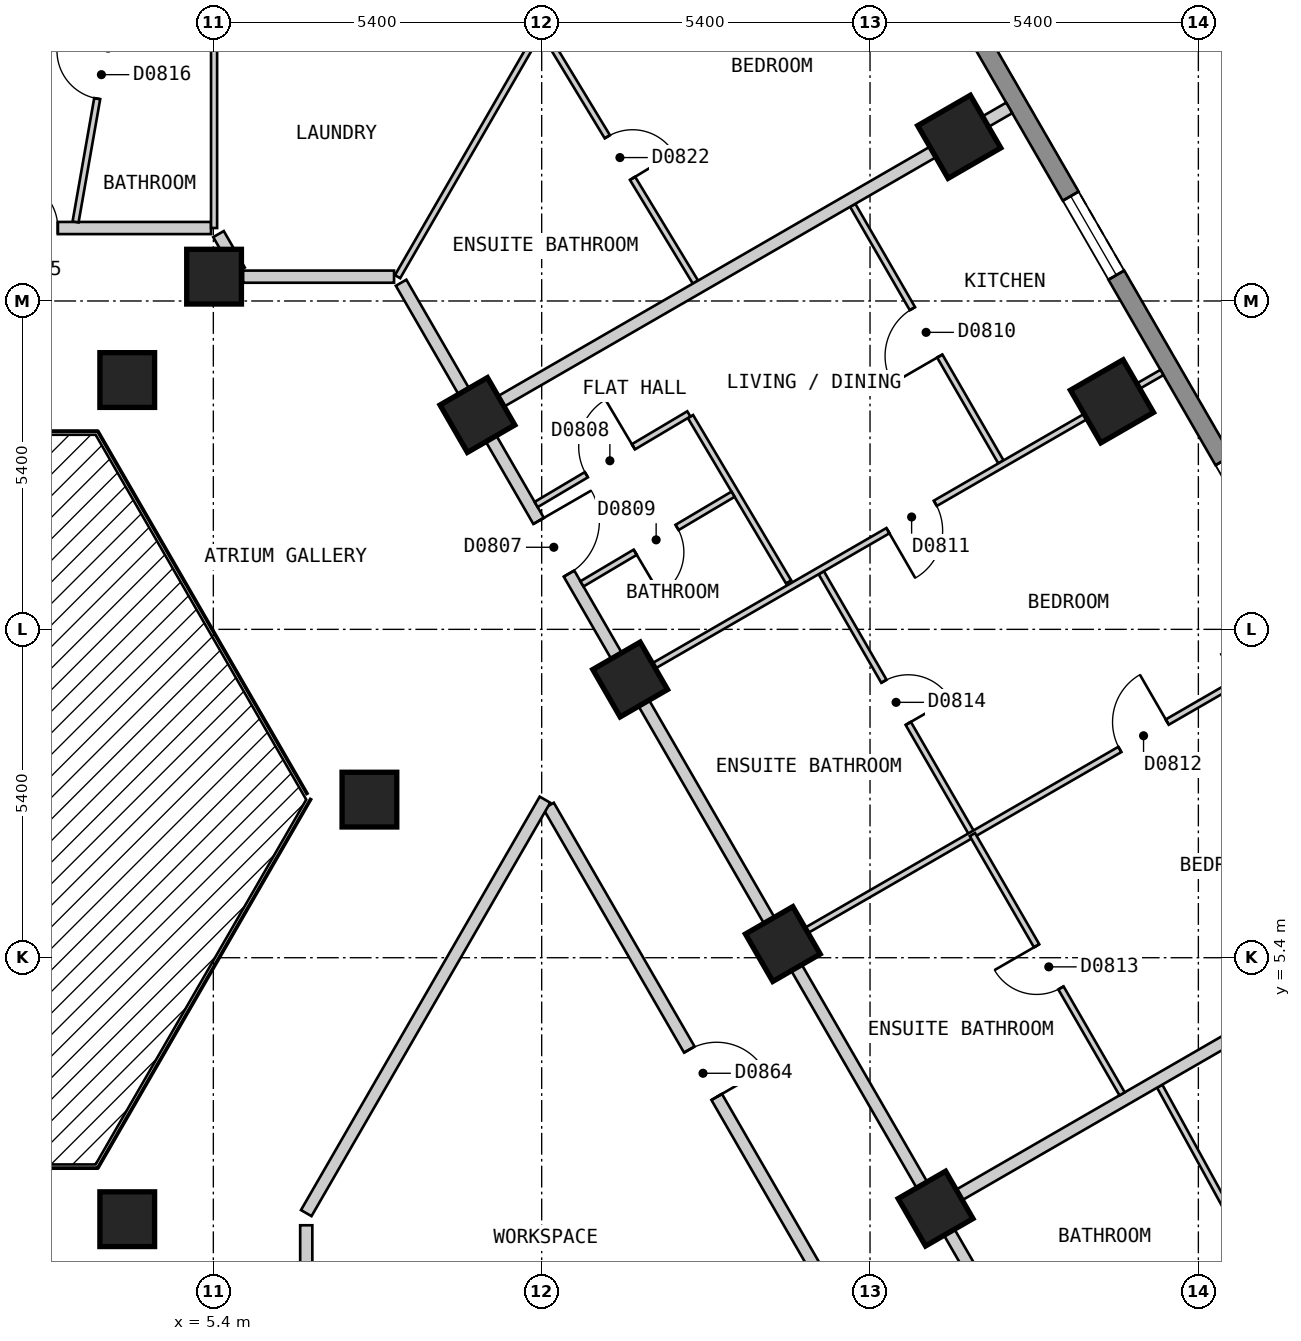
"""IFC4 building model, lengths in metres.
Left out: names, types, materials, properties, quantities, classifications, styles, units other than length and angle.
Written with IfcOpenShell. Run it as: python <this file> out.ifc"""

import sys

from ifc_helpers import new_model, si_unit, direction, frame, frame_2d, origin, origin_2d, place, context, subcontext, project, spatial, polyline, rectangle, outline, extrude, element, fill, save


model = new_model("IFC4")
c1 = context("Model", 3, precision=1e-05, world=origin(), true_north=direction((0.0, 1.0)))
c2 = subcontext(c1, "Body", "Model", "MODEL_VIEW")
j1 = project(units=[si_unit("LENGTHUNIT", "METRE"), si_unit("PLANEANGLEUNIT", "RADIAN")], contexts=[c1])
p1 = place(None, origin())
s1 = spatial("IfcSite", under=j1, at=p1, CompositionType="ELEMENT")
p2 = place(p1, origin())
s2 = spatial("IfcBuilding", under=s1, at=p2, CompositionType="ELEMENT")
p3 = place(p2, frame((0.0, 0.0, 72.0)))
s3 = spatial("IfcBuildingStorey", under=s2, at=p3, CompositionType="ELEMENT", Elevation=72.0)
for number, where, z_axis, x_axis in (
    (1, (20.179, 14.55, 0.0), (0.0, 0.0, 1.0), (-0.5, 0.866, 0.0)),
    (2, (17.667, 18.9, 0.0), (0.0, 0.0, 1.0), (-0.5, 0.866, 0.0)),
):
    element("IfcColumn", number, at=place(p3, frame(where, z_axis=z_axis, x_axis=x_axis)), inside=s3, PredefinedType="COLUMN", context=c2, shape_type="SweptSolid", body=[
        extrude(rectangle(XDim=1.0, YDim=1.0, at=origin_2d()), origin(), (0.0, 0.0, 1.0), 3.0),
    ])
for number, where, z_axis, x_axis in (
    (3, (17.278, 1.274, 0.0), (0.0, 0.0, 1.0), (-0.5, 0.866, 0.0)),
    (4, (3.984, 1.1, 0.0), (0.0, 0.0, 1.0), (1.0, 0.0, 0.0)),
    (5, (14.766, 5.625, 0.0), (0.0, 0.0, 1.0), (-0.5, 0.866, 0.0)),
    (6, (12.255, 9.975, 0.0), (0.0, 0.0, 1.0), (-0.5, 0.866, 0.0)),
    (7, (7.967, 8.0, 0.0), (0.0, 0.0, 1.0), (1.0, 0.0, 0.0)),
    (8, (9.743, 14.325, 0.0), (0.0, 0.0, 1.0), (-0.5, 0.866, 0.0)),
    (9, (5.412, 16.6, 0.0), (0.0, 0.0, 1.0), (-1.0, 0.0, 0.0)),
    (10, (3.984, 14.9, 0.0), (0.0, 0.0, 1.0), (1.0, 0.0, 0.0)),
):
    element("IfcColumn", number, at=place(p3, frame(where, z_axis=z_axis, x_axis=x_axis)), inside=s3, PredefinedType="COLUMN", context=c2, shape_type="SweptSolid", body=[
        extrude(rectangle(XDim=0.9, YDim=0.9, at=origin_2d()), origin(), (0.0, 0.0, 1.0), 3.0),
    ])
p4 = place(p3, frame((29.027, 1.425, 0.0), z_axis=(0.0, 0.0, 1.0), x_axis=(-0.500027479704, 0.866009537788, 0.0)))
e11 = element("IfcWall", 11, at=p4, inside=s3, PredefinedType="SOLIDWALL", context=c2, shape_type="SweptSolid", body=[
    extrude(outline(polyline([(0.0, -0.15), (26.559, -0.15), (26.478, 0.15), (0.08, 0.15), (0.0, -0.15)])), origin(), (0.0, 0.0, 1.0), 2.7),
])
p5 = place(p4, frame((2.483, 0.0, 0.15)))
e12 = element("IfcOpeningElement", 12, at=p5, cuts=e11, PredefinedType="OPENING", context=c2, shape_type="SweptSolid", body=[
    extrude(rectangle(XDim=1.5, YDim=2.1, at=frame_2d((0.75, 1.05))), frame((0.0, 0.16, 0.0), z_axis=(0.0, -1.0, 0.0), x_axis=(1.0, 0.0, 0.0)), (0.0, 0.0, 1.0), 0.32),
])
p6 = place(p4, frame((7.506, 0.0, 0.15)))
e13 = element("IfcOpeningElement", 13, at=p6, cuts=e11, PredefinedType="OPENING", context=c2, shape_type="SweptSolid", body=[
    extrude(rectangle(XDim=1.5, YDim=2.1, at=frame_2d((0.75, 1.05))), frame((0.0, 0.16, 0.0), z_axis=(0.0, -1.0, 0.0), x_axis=(1.0, 0.0, 0.0)), (0.0, 0.0, 1.0), 0.32),
])
p7 = place(p4, frame((12.529, 0.0, 0.15)))
e14 = element("IfcOpeningElement", 14, at=p7, cuts=e11, PredefinedType="OPENING", context=c2, shape_type="SweptSolid", body=[
    extrude(rectangle(XDim=1.5, YDim=2.1, at=frame_2d((0.75, 1.05))), frame((0.0, 0.16, 0.0), z_axis=(0.0, -1.0, 0.0), x_axis=(1.0, 0.0, 0.0)), (0.0, 0.0, 1.0), 0.32),
])
p8 = place(p4, frame((17.552, 0.0, 0.15)))
e15 = element("IfcOpeningElement", 15, at=p8, cuts=e11, PredefinedType="OPENING", context=c2, shape_type="SweptSolid", body=[
    extrude(rectangle(XDim=1.5, YDim=2.1, at=frame_2d((0.75, 1.05))), frame((0.0, 0.16, 0.0), z_axis=(0.0, -1.0, 0.0), x_axis=(1.0, 0.0, 0.0)), (0.0, 0.0, 1.0), 0.32),
])
p9 = place(p4, frame((22.575, 0.0, 0.15)))
e16 = element("IfcOpeningElement", 16, at=p9, cuts=e11, PredefinedType="OPENING", context=c2, shape_type="SweptSolid", body=[
    extrude(rectangle(XDim=1.5, YDim=2.1, at=frame_2d((0.75, 1.05))), frame((0.0, 0.16, 0.0), z_axis=(0.0, -1.0, 0.0), x_axis=(1.0, 0.0, 0.0)), (0.0, 0.0, 1.0), 0.32),
])
p10 = place(p3, frame((5.485, 17.3, 0.0), z_axis=(0.0, 0.0, 1.0), x_axis=(0.499437640892, -0.866349838611, 0.0)))
e17 = element("IfcWall", 17, at=p10, inside=s3, PredefinedType="PARTITIONING", context=c2, shape_type="SweptSolid", body=[
    extrude(rectangle(XDim=0.693, YDim=0.2, at=frame_2d((0.346, 0.0))), origin(), (0.0, 0.0, 1.0), 2.7),
])
p11 = place(p3, frame((10.913, 7.899, 0.0), z_axis=(0.0, 0.0, 1.0), x_axis=(0.500028940566, -0.866008694296, 0.0)))
e18 = element("IfcWall", 18, at=p11, inside=s3, PredefinedType="PARTITIONING", context=c2, shape_type="SweptSolid", body=[
    extrude(rectangle(XDim=10.159, YDim=0.2, at=frame_2d((5.08, 0.0))), origin(), (0.0, 0.0, 1.0), 2.7),
])
p12 = place(p11, frame((4.63, 0.0, 0.0)))
e19 = element("IfcOpeningElement", 19, at=p12, cuts=e18, PredefinedType="OPENING", context=c2, shape_type="SweptSolid", body=[
    extrude(rectangle(XDim=0.9, YDim=2.1, at=frame_2d((0.45, 1.05))), frame((0.0, 0.11, 0.0), z_axis=(0.0, -1.0, 0.0), x_axis=(1.0, 0.0, 0.0)), (0.0, 0.0, 1.0), 0.22),
])
p13 = place(p3, frame((8.488, 16.5, 0.0), z_axis=(0.0, 0.0, 1.0), x_axis=(0.499986836607, -0.86603300354, 0.0)))
e20 = element("IfcWall", 20, at=p13, inside=s3, PredefinedType="PARTITIONING", context=c2, shape_type="SweptSolid", body=[
    extrude(rectangle(XDim=20.09, YDim=0.2, at=frame_2d((10.045, 0.0))), origin(), (0.0, 0.0, 1.0), 2.7),
])
p14 = place(p13, frame((4.523, 0.0, 0.0)))
e21 = element("IfcOpeningElement", 21, at=p14, cuts=e20, PredefinedType="OPENING", context=c2, shape_type="SweptSolid", body=[
    extrude(rectangle(XDim=1.0, YDim=2.1, at=frame_2d((0.5, 1.05))), frame((0.0, 0.11, 0.0), z_axis=(0.0, -1.0, 0.0), x_axis=(1.0, 0.0, 0.0)), (0.0, 0.0, 1.0), 0.22),
])
p15 = place(p3, frame((6.928, 1.0, 0.0), z_axis=(0.0, 0.0, 1.0), x_axis=(0.0, -1.0, 0.0)))
e22 = element("IfcWall", 22, at=p15, inside=s3, PredefinedType="PARTITIONING", context=c2, shape_type="SweptSolid", body=[
    extrude(rectangle(XDim=3.699, YDim=0.2, at=frame_2d((1.85, 0.0))), origin(), (0.0, 0.0, 1.0), 2.7),
])
p16 = place(p3, frame((5.889, 16.6, 0.0), z_axis=(0.0, 0.0, 1.0), x_axis=(1.0, 0.0, 0.0)))
e23 = element("IfcWall", 23, at=p16, inside=s3, PredefinedType="PARTITIONING", context=c2, shape_type="SweptSolid", body=[
    extrude(rectangle(XDim=2.483, YDim=0.2, at=frame_2d((1.242, 0.0))), origin(), (0.0, 0.0, 1.0), 2.7),
])
p17 = place(p3, frame((1.75, 17.4, 0.0), z_axis=(0.0, 0.0, 1.0), x_axis=(1.0, 0.0, 0.0)))
e24 = element("IfcWall", 24, at=p17, inside=s3, PredefinedType="PARTITIONING", context=c2, shape_type="SweptSolid", body=[
    extrude(rectangle(XDim=3.612, YDim=0.2, at=frame_2d((1.806, 0.0))), origin(), (0.0, 0.0, 1.0), 2.7),
])
p18 = place(p17, frame((0.292, 0.0, 0.0)))
e25 = element("IfcOpeningElement", 25, at=p18, cuts=e24, PredefinedType="OPENING", context=c2, shape_type="SweptSolid", body=[
    extrude(rectangle(XDim=0.8, YDim=2.1, at=frame_2d((0.4, 1.05))), frame((0.0, 0.11, 0.0), z_axis=(0.0, -1.0, 0.0), x_axis=(1.0, 0.0, 0.0)), (0.0, 0.0, 1.0), 0.22),
])
p19 = place(p3, frame((6.928, 1.2, 0.0), z_axis=(0.0, 0.0, 1.0), x_axis=(0.500055327065, 0.865993458332, 0.0)))
e26 = element("IfcWall", 26, at=p19, inside=s3, PredefinedType="PARTITIONING", context=c2, shape_type="SweptSolid", body=[
    extrude(rectangle(XDim=7.851, YDim=0.2, at=frame_2d((3.926, 0.0))), origin(), (0.0, 0.0, 1.0), 2.7),
])
p20 = place(p3, frame((10.843, 20.61, 0.0), z_axis=(0.0, 0.0, 1.0), x_axis=(0.518481125811, -0.855089072657, 0.0)))
e27 = element("IfcWall", 27, at=p20, inside=s3, PredefinedType="PARTITIONING", context=c2, shape_type="SweptSolid", body=[
    extrude(rectangle(XDim=4.795, YDim=0.1, at=frame_2d((2.397, 0.0))), origin(), (0.0, 0.0, 1.0), 2.7),
])
p21 = place(p20, frame((1.999, 0.0, 0.0)))
e28 = element("IfcOpeningElement", 28, at=p21, cuts=e27, PredefinedType="OPENING", context=c2, shape_type="SweptSolid", body=[
    extrude(rectangle(XDim=0.8, YDim=2.1, at=frame_2d((0.4, 1.05))), frame((0.0, 0.06, 0.0), z_axis=(0.0, -1.0, 0.0), x_axis=(1.0, 0.0, 0.0)), (0.0, 0.0, 1.0), 0.12),
])
p22 = place(p3, frame((13.247, 14.3, 0.0), z_axis=(0.0, 0.0, 1.0), x_axis=(0.510312234073, -0.85998919979, 0.0)))
e29 = element("IfcWall", 29, at=p22, inside=s3, PredefinedType="PARTITIONING", context=c2, shape_type="SweptSolid", body=[
    extrude(rectangle(XDim=3.163, YDim=0.1, at=frame_2d((1.582, 0.0))), origin(), (0.0, 0.0, 1.0), 2.7),
])
p23 = place(p3, frame((15.398, 11.731, 0.0), z_axis=(0.0, 0.0, 1.0), x_axis=(0.500010064822, -0.866019592779, 0.0)))
e30 = element("IfcWall", 30, at=p23, inside=s3, PredefinedType="PARTITIONING", context=c2, shape_type="SweptSolid", body=[
    extrude(rectangle(XDim=4.972, YDim=0.1, at=frame_2d((2.486, 0.0))), origin(), (0.0, 0.0, 1.0), 2.7),
])
p24 = place(p23, frame((2.061, 0.0, 0.0)))
e31 = element("IfcOpeningElement", 31, at=p24, cuts=e30, PredefinedType="OPENING", context=c2, shape_type="SweptSolid", body=[
    extrude(rectangle(XDim=0.8, YDim=2.1, at=frame_2d((0.4, 1.05))), frame((0.0, 0.06, 0.0), z_axis=(0.0, -1.0, 0.0), x_axis=(1.0, 0.0, 0.0)), (0.0, 0.0, 1.0), 0.12),
])
p25 = place(p3, frame((15.916, 17.773, 0.0), z_axis=(0.0, 0.0, 1.0), x_axis=(0.500093956194, -0.865971151354, 0.0)))
e32 = element("IfcWall", 32, at=p25, inside=s3, PredefinedType="PARTITIONING", context=c2, shape_type="SweptSolid", body=[
    extrude(rectangle(XDim=4.873, YDim=0.1, at=frame_2d((2.437, 0.0))), origin(), (0.0, 0.0, 1.0), 2.7),
])
p26 = place(p25, frame((1.962, 0.0, 0.0)))
e33 = element("IfcOpeningElement", 33, at=p26, cuts=e32, PredefinedType="OPENING", context=c2, shape_type="SweptSolid", body=[
    extrude(rectangle(XDim=0.9, YDim=2.1, at=frame_2d((0.45, 1.05))), frame((0.0, 0.06, 0.0), z_axis=(0.0, -1.0, 0.0), x_axis=(1.0, 0.0, 0.0)), (0.0, 0.0, 1.0), 0.12),
])
p27 = place(p3, frame((20.964, 3.287, 0.0), z_axis=(0.0, 0.0, 1.0), x_axis=(0.48115599782, -0.87663499004, 0.0)))
e34 = element("IfcWall", 34, at=p27, inside=s3, PredefinedType="PARTITIONING", context=c2, shape_type="SweptSolid", body=[
    extrude(rectangle(XDim=4.83, YDim=0.1, at=frame_2d((2.415, 0.0))), origin(), (0.0, 0.0, 1.0), 2.7),
])
p28 = place(p3, frame((8.43, 16.6, 0.0), z_axis=(0.0, 0.0, 1.0), x_axis=(0.50003312339, 0.866006279142, 0.0)))
e35 = element("IfcWall", 35, at=p28, inside=s3, PredefinedType="PARTITIONING", context=c2, shape_type="SweptSolid", body=[
    extrude(rectangle(XDim=4.626, YDim=0.1, at=frame_2d((2.313, 0.0))), origin(), (0.0, 0.0, 1.0), 2.7),
])
p29 = place(p3, frame((3.134, 17.5, 0.0), z_axis=(0.0, 0.0, 1.0), x_axis=(0.172821216702, 0.984953210593, 0.0)))
e36 = element("IfcWall", 36, at=p29, inside=s3, PredefinedType="PARTITIONING", context=c2, shape_type="SweptSolid", body=[
    extrude(rectangle(XDim=4.97, YDim=0.1, at=frame_2d((2.485, 0.0))), origin(), (0.0, 0.0, 1.0), 2.7),
])
p30 = place(p29, frame((2.059, 0.0, 0.0)))
e37 = element("IfcOpeningElement", 37, at=p30, cuts=e36, PredefinedType="OPENING", context=c2, shape_type="SweptSolid", body=[
    extrude(rectangle(XDim=0.8, YDim=2.1, at=frame_2d((0.4, 1.05))), frame((0.0, 0.06, 0.0), z_axis=(0.0, -1.0, 0.0), x_axis=(1.0, 0.0, 0.0)), (0.0, 0.0, 1.0), 0.12),
])
p31 = place(p3, frame((5.412, 17.4, 0.0), z_axis=(0.0, 0.0, 1.0), x_axis=(0.0, 1.0, 0.0)))
e38 = element("IfcWall", 38, at=p31, inside=s3, PredefinedType="PARTITIONING", context=c2, shape_type="SweptSolid", body=[
    extrude(rectangle(XDim=4.925, YDim=0.1, at=frame_2d((2.462, 0.0))), origin(), (0.0, 0.0, 1.0), 2.7),
])
p32 = place(p3, frame((14.853, 5.675, 0.0), z_axis=(0.0, 0.0, 1.0), x_axis=(0.866016855193, 0.500014806302, 0.0)))
e39 = element("IfcWall", 39, at=p32, inside=s3, PredefinedType="PARTITIONING", context=c2, shape_type="SweptSolid", body=[
    extrude(rectangle(XDim=10.0, YDim=0.1, at=frame_2d((5.0, 0.0))), origin(), (0.0, 0.0, 1.0), 2.7),
])
p33 = place(p32, frame((6.3, 0.0, 0.0)))
e40 = element("IfcOpeningElement", 40, at=p33, cuts=e39, PredefinedType="OPENING", context=c2, shape_type="SweptSolid", body=[
    extrude(rectangle(XDim=0.9, YDim=2.1, at=frame_2d((0.45, 1.05))), frame((0.0, 0.06, 0.0), z_axis=(0.0, -1.0, 0.0), x_axis=(1.0, 0.0, 0.0)), (0.0, 0.0, 1.0), 0.12),
])
p34 = place(p3, frame((12.342, 10.025, 0.0), z_axis=(0.0, 0.0, 1.0), x_axis=(0.865992435864, 0.500057097767, 0.0)))
e41 = element("IfcWall", 41, at=p34, inside=s3, PredefinedType="PARTITIONING", context=c2, shape_type="SweptSolid", body=[
    extrude(rectangle(XDim=9.999, YDim=0.1, at=frame_2d((5.0, 0.0))), origin(), (0.0, 0.0, 1.0), 2.7),
])
p35 = place(p34, frame((4.795, 0.0, 0.0)))
e42 = element("IfcOpeningElement", 42, at=p35, cuts=e41, PredefinedType="OPENING", context=c2, shape_type="SweptSolid", body=[
    extrude(rectangle(XDim=0.9, YDim=2.1, at=frame_2d((0.45, 1.05))), frame((0.0, 0.06, 0.0), z_axis=(0.0, -1.0, 0.0), x_axis=(1.0, 0.0, 0.0)), (0.0, 0.0, 1.0), 0.12),
])
p36 = place(p3, frame((11.462, 11.548, 0.0), z_axis=(0.0, 0.0, 1.0), x_axis=(0.860106181478, 0.510115042498, 0.0)))
e43 = element("IfcWall", 43, at=p36, inside=s3, PredefinedType="PARTITIONING", context=c2, shape_type="SweptSolid", body=[
    extrude(rectangle(XDim=2.889, YDim=0.1, at=frame_2d((1.445, 0.0))), origin(), (0.0, 0.0, 1.0), 2.7),
])
p37 = place(p36, frame((1.019, 0.0, 0.0)))
e44 = element("IfcOpeningElement", 44, at=p37, cuts=e43, PredefinedType="OPENING", context=c2, shape_type="SweptSolid", body=[
    extrude(rectangle(XDim=0.8, YDim=2.1, at=frame_2d((0.4, 1.05))), frame((0.0, 0.06, 0.0), z_axis=(0.0, -1.0, 0.0), x_axis=(1.0, 0.0, 0.0)), (0.0, 0.0, 1.0), 0.12),
])
p38 = place(p3, frame((10.709, 12.853, 0.0), z_axis=(0.0, 0.0, 1.0), x_axis=(0.859991215576, 0.510308837011, 0.0)))
e45 = element("IfcWall", 45, at=p38, inside=s3, PredefinedType="PARTITIONING", context=c2, shape_type="SweptSolid", body=[
    extrude(rectangle(XDim=2.92, YDim=0.1, at=frame_2d((1.46, 0.0))), origin(), (0.0, 0.0, 1.0), 2.7),
])
p39 = place(p38, frame((0.96, 0.0, 0.0)))
e46 = element("IfcOpeningElement", 46, at=p39, cuts=e45, PredefinedType="OPENING", context=c2, shape_type="SweptSolid", body=[
    extrude(rectangle(XDim=0.9, YDim=2.1, at=frame_2d((0.45, 1.05))), frame((0.0, 0.06, 0.0), z_axis=(0.0, -1.0, 0.0), x_axis=(1.0, 0.0, 0.0)), (0.0, 0.0, 1.0), 0.12),
])
p40 = place(p3, frame((17.365, 1.325, 0.0), z_axis=(0.0, 0.0, 1.0), x_axis=(0.866016855193, 0.500014806302, 0.0)))
e47 = element("IfcWall", 47, at=p40, inside=s3, PredefinedType="PARTITIONING", context=c2, shape_type="SweptSolid", body=[
    extrude(rectangle(XDim=10.0, YDim=0.2, at=frame_2d((5.0, 0.0))), origin(), (0.0, 0.0, 1.0), 2.7),
])
p41 = place(p3, frame((9.83, 14.375, 0.0), z_axis=(0.0, 0.0, 1.0), x_axis=(0.865992435864, 0.500057097767, 0.0)))
e48 = element("IfcWall", 48, at=p41, inside=s3, PredefinedType="PARTITIONING", context=c2, shape_type="SweptSolid", body=[
    extrude(rectangle(XDim=9.999, YDim=0.2, at=frame_2d((5.0, 0.0))), origin(), (0.0, 0.0, 1.0), 2.7),
])
p42 = place(p3, frame((17.884, 7.425, 0.0), z_axis=(0.0, 0.0, 1.0), x_axis=(0.500000007376, -0.866025399526, 0.0)))
e49 = element("IfcWall", 49, at=p42, inside=s3, PredefinedType="PARTITIONING", context=c2, shape_type="SweptSolid", body=[
    extrude(rectangle(XDim=4.924, YDim=0.1, at=frame_2d((2.462, 0.0))), origin(), (0.0, 0.0, 1.0), 2.7),
])
p43 = place(p42, frame((2.112, 0.0, 0.0)))
e50 = element("IfcOpeningElement", 50, at=p43, cuts=e49, PredefinedType="OPENING", context=c2, shape_type="SweptSolid", body=[
    extrude(rectangle(XDim=0.8, YDim=2.1, at=frame_2d((0.4, 1.05))), frame((0.0, 0.06, 0.0), z_axis=(0.0, -1.0, 0.0), x_axis=(1.0, 0.0, 0.0)), (0.0, 0.0, 1.0), 0.12),
])
p44 = place(p8, origin())
e51 = element("IfcWindow", 51, at=p44, inside=s3, PartitioningType="SINGLE_PANEL", PredefinedType="WINDOW", context=c2, shape_type="SweptSolid", body=[
    extrude(rectangle(XDim=1.5, YDim=2.1, at=frame_2d((0.75, 1.05))), frame((0.0, 0.03, 0.0), z_axis=(0.0, -1.0, 0.0), x_axis=(1.0, 0.0, 0.0)), (0.0, 0.0, 1.0), 0.06),
])
fill(e15, e51)
p45 = place(p14, origin())
e52 = element("IfcDoor", 52, at=p45, inside=s3, OperationType="SINGLE_SWING_LEFT", PredefinedType="DOOR", context=c2, shape_type="SweptSolid", body=[
    extrude(rectangle(XDim=1.0, YDim=2.1, at=frame_2d((0.5, 1.05))), frame((0.0, 0.025, 0.0), z_axis=(0.0, -1.0, 0.0), x_axis=(1.0, 0.0, 0.0)), (0.0, 0.0, 1.0), 0.05),
])
fill(e21, e52)
p46 = place(p39, origin())
e53 = element("IfcDoor", 53, at=p46, inside=s3, OperationType="SINGLE_SWING_RIGHT", PredefinedType="DOOR", context=c2, shape_type="SweptSolid", body=[
    extrude(rectangle(XDim=0.9, YDim=2.1, at=frame_2d((0.45, 1.05))), frame((0.0, 0.025, 0.0), z_axis=(0.0, -1.0, 0.0), x_axis=(1.0, 0.0, 0.0)), (0.0, 0.0, 1.0), 0.05),
])
fill(e46, e53)
p47 = place(p37, origin())
e54 = element("IfcDoor", 54, at=p47, inside=s3, OperationType="SINGLE_SWING_LEFT", PredefinedType="DOOR", context=c2, shape_type="SweptSolid", body=[
    extrude(rectangle(XDim=0.8, YDim=2.1, at=frame_2d((0.4, 1.05))), frame((0.0, 0.025, 0.0), z_axis=(0.0, -1.0, 0.0), x_axis=(1.0, 0.0, 0.0)), (0.0, 0.0, 1.0), 0.05),
])
fill(e44, e54)
p48 = place(p26, origin())
e55 = element("IfcDoor", 55, at=p48, inside=s3, OperationType="SINGLE_SWING_RIGHT", PredefinedType="DOOR", context=c2, shape_type="SweptSolid", body=[
    extrude(rectangle(XDim=0.9, YDim=2.1, at=frame_2d((0.45, 1.05))), frame((0.0, 0.025, 0.0), z_axis=(0.0, -1.0, 0.0), x_axis=(1.0, 0.0, 0.0)), (0.0, 0.0, 1.0), 0.05),
])
fill(e33, e55)
p49 = place(p35, origin())
e56 = element("IfcDoor", 56, at=p49, inside=s3, OperationType="SINGLE_SWING_LEFT", PredefinedType="DOOR", context=c2, shape_type="SweptSolid", body=[
    extrude(rectangle(XDim=0.9, YDim=2.1, at=frame_2d((0.45, 1.05))), frame((0.0, 0.025, 0.0), z_axis=(0.0, -1.0, 0.0), x_axis=(1.0, 0.0, 0.0)), (0.0, 0.0, 1.0), 0.05),
])
fill(e42, e56)
p50 = place(p33, origin())
e57 = element("IfcDoor", 57, at=p50, inside=s3, OperationType="SINGLE_SWING_RIGHT", PredefinedType="DOOR", context=c2, shape_type="SweptSolid", body=[
    extrude(rectangle(XDim=0.9, YDim=2.1, at=frame_2d((0.45, 1.05))), frame((0.0, 0.025, 0.0), z_axis=(0.0, -1.0, 0.0), x_axis=(1.0, 0.0, 0.0)), (0.0, 0.0, 1.0), 0.05),
])
fill(e40, e57)
p51 = place(p43, origin())
e58 = element("IfcDoor", 58, at=p51, inside=s3, OperationType="SINGLE_SWING_LEFT", PredefinedType="DOOR", context=c2, shape_type="SweptSolid", body=[
    extrude(rectangle(XDim=0.8, YDim=2.1, at=frame_2d((0.4, 1.05))), frame((0.0, 0.025, 0.0), z_axis=(0.0, -1.0, 0.0), x_axis=(1.0, 0.0, 0.0)), (0.0, 0.0, 1.0), 0.05),
])
fill(e50, e58)
p52 = place(p24, origin())
e59 = element("IfcDoor", 59, at=p52, inside=s3, OperationType="SINGLE_SWING_RIGHT", PredefinedType="DOOR", context=c2, shape_type="SweptSolid", body=[
    extrude(rectangle(XDim=0.8, YDim=2.1, at=frame_2d((0.4, 1.05))), frame((0.0, 0.025, 0.0), z_axis=(0.0, -1.0, 0.0), x_axis=(1.0, 0.0, 0.0)), (0.0, 0.0, 1.0), 0.05),
])
fill(e31, e59)
p53 = place(p18, origin())
e60 = element("IfcDoor", 60, at=p53, inside=s3, OperationType="SINGLE_SWING_LEFT", PredefinedType="DOOR", context=c2, shape_type="SweptSolid", body=[
    extrude(rectangle(XDim=0.8, YDim=2.1, at=frame_2d((0.4, 1.05))), frame((0.0, 0.025, 0.0), z_axis=(0.0, -1.0, 0.0), x_axis=(1.0, 0.0, 0.0)), (0.0, 0.0, 1.0), 0.05),
])
fill(e25, e60)
p54 = place(p30, origin())
e61 = element("IfcDoor", 61, at=p54, inside=s3, OperationType="SINGLE_SWING_RIGHT", PredefinedType="DOOR", context=c2, shape_type="SweptSolid", body=[
    extrude(rectangle(XDim=0.8, YDim=2.1, at=frame_2d((0.4, 1.05))), frame((0.0, 0.025, 0.0), z_axis=(0.0, -1.0, 0.0), x_axis=(1.0, 0.0, 0.0)), (0.0, 0.0, 1.0), 0.05),
])
fill(e37, e61)
p55 = place(p21, origin())
e62 = element("IfcDoor", 62, at=p55, inside=s3, OperationType="SINGLE_SWING_RIGHT", PredefinedType="DOOR", context=c2, shape_type="SweptSolid", body=[
    extrude(rectangle(XDim=0.8, YDim=2.1, at=frame_2d((0.4, 1.05))), frame((0.0, 0.025, 0.0), z_axis=(0.0, -1.0, 0.0), x_axis=(1.0, 0.0, 0.0)), (0.0, 0.0, 1.0), 0.05),
])
fill(e28, e62)
p56 = place(p12, origin())
e63 = element("IfcDoor", 63, at=p56, inside=s3, OperationType="SINGLE_SWING_RIGHT", PredefinedType="DOOR", context=c2, shape_type="SweptSolid", body=[
    extrude(rectangle(XDim=0.9, YDim=2.1, at=frame_2d((0.45, 1.05))), frame((0.0, 0.025, 0.0), z_axis=(0.0, -1.0, 0.0), x_axis=(1.0, 0.0, 0.0)), (0.0, 0.0, 1.0), 0.05),
])
fill(e19, e63)
save(model, sys.argv[1])
